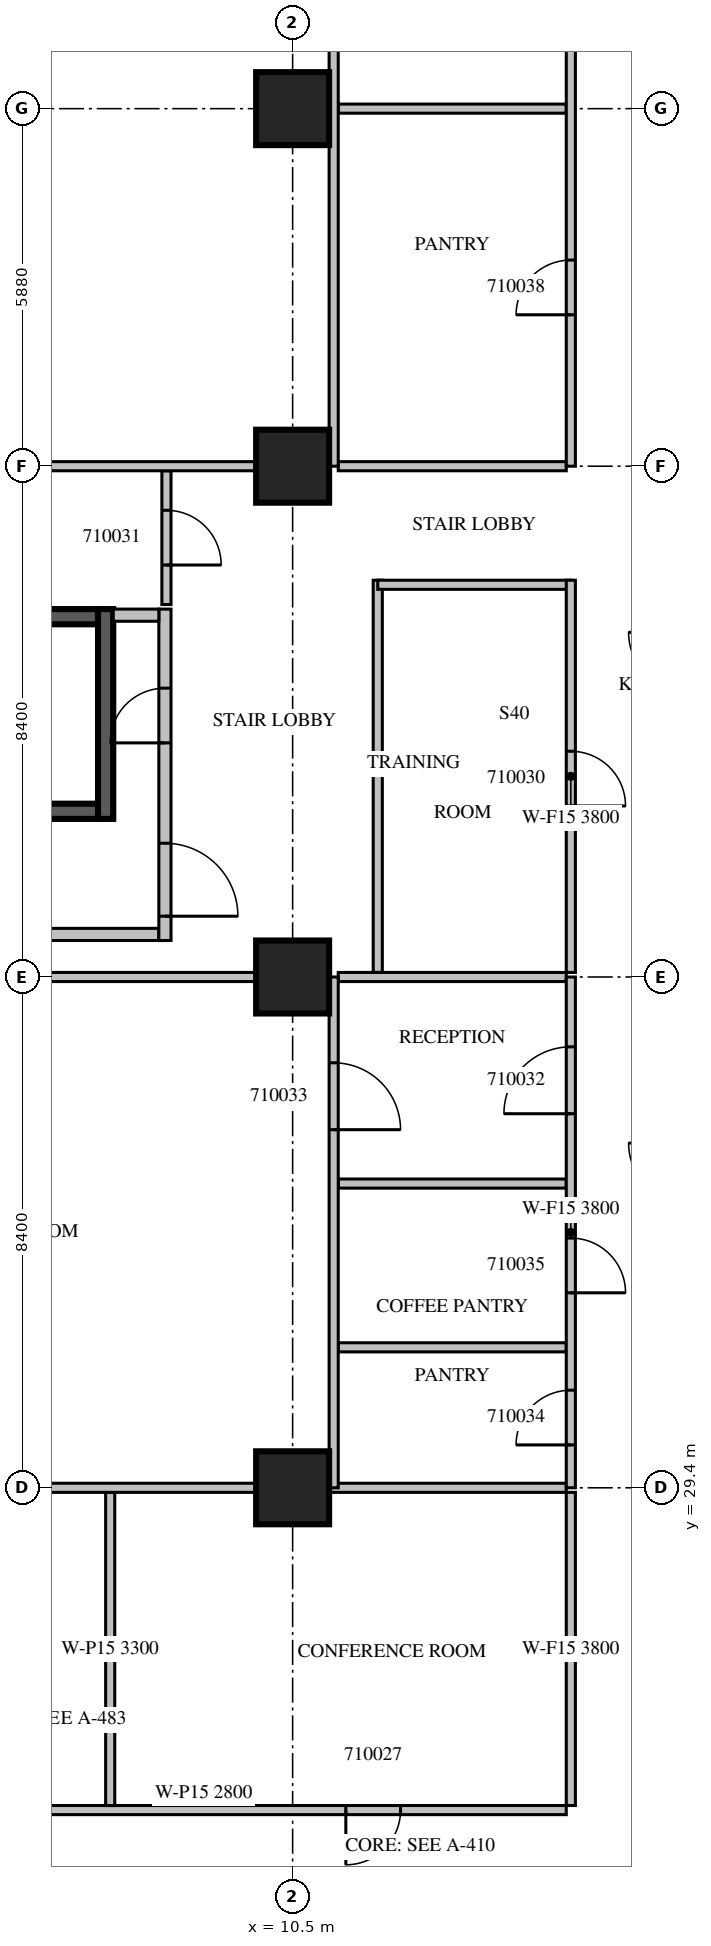
"""IFC4 building model, lengths in metres.
Left out: names, types, materials, properties, quantities, classifications, styles, units other than length and angle.
Written with IfcOpenShell. Run it as: python <this file> out.ifc"""

import sys

from ifc_helpers import new_model, si_unit, direction, frame, frame_2d, origin, origin_2d, place, context, subcontext, project, spatial, rectangle, extrude, source, transform, mapped, element, fill, save


model = new_model("IFC4")
c1 = context("Model", 3, precision=1e-05, world=origin(), true_north=direction((0.0, 1.0)))
c2 = subcontext(c1, "Body", "Model", "MODEL_VIEW")
j1 = project(units=[si_unit("LENGTHUNIT", "METRE"), si_unit("PLANEANGLEUNIT", "RADIAN")], contexts=[c1])
p1 = place(None, origin())
s1 = spatial("IfcSite", under=j1, at=p1, CompositionType="ELEMENT")
p2 = place(p1, origin())
s2 = spatial("IfcBuilding", under=s1, at=p2, CompositionType="ELEMENT")
p3 = place(p2, frame((0.0, 0.0, 53.1)))
s3 = spatial("IfcBuildingStorey", under=s2, at=p3, CompositionType="ELEMENT", Elevation=53.1)
m1 = source(origin(), c2, "Body", "SweptSolid", [
    extrude(rectangle(XDim=1.2, YDim=1.2, at=origin_2d()), origin(), (0.0, 0.0, 1.0), 4.2),
])
for number, where, z_axis, x_axis in (
    (1, (10.5, 29.4, 0.0), (0.0, 0.0, 1.0), (1.0, 0.0, 0.0)),
    (2, (10.5, 37.8, 0.0), (0.0, 0.0, 1.0), (1.0, 0.0, 0.0)),
    (3, (10.5, 46.2, 0.0), (0.0, 0.0, 1.0), (1.0, 0.0, 0.0)),
    (4, (10.5, 52.08, 0.0), (0.0, 0.0, 1.0), (1.0, 0.0, 0.0)),
):
    element("IfcColumn", number, at=place(p3, frame(where, z_axis=z_axis, x_axis=x_axis)), inside=s3, PredefinedType="COLUMN", context=c2, shape_type="MappedRepresentation", body=[
        mapped(m1, transform((0.0, 0.0, 0.0), scale=1.0)),
    ])
m2 = source(origin(), c2, "Body", "SweptSolid", [
    extrude(rectangle(XDim=7.0, YDim=0.25, at=frame_2d((3.5, 0.0))), origin(), (0.0, 0.0, 1.0), 3.8),
])
p4 = place(p3, frame((0.3, 40.525, 0.0), z_axis=(0.0, 0.0, 1.0), x_axis=(1.0, 0.0, 0.0)))
e5 = element("IfcWall", 5, at=p4, inside=s3, PredefinedType="SOLIDWALL", context=c2, shape_type="MappedRepresentation", body=[
    mapped(m2, transform((0.0, 0.0, 0.0), scale=1.0)),
])
m3 = source(origin(), c2, "Body", "SweptSolid", [
    extrude(rectangle(XDim=1.1, YDim=2.1, at=frame_2d((0.55, 1.05))), frame((0.0, 0.135, 0.0), z_axis=(0.0, -1.0, 0.0), x_axis=(1.0, 0.0, 0.0)), (0.0, 0.0, 1.0), 0.27),
])
p5 = place(p4, frame((0.55, 0.0, 0.0)))
e6 = element("IfcOpeningElement", 6, at=p5, cuts=e5, PredefinedType="OPENING", context=c2, shape_type="MappedRepresentation", body=[
    mapped(m3, transform((0.0, 0.0, 0.0), scale=1.0)),
])
p6 = place(p3, frame((0.3, 43.725, 0.0), z_axis=(0.0, 0.0, 1.0), x_axis=(1.0, 0.0, 0.0)))
e7 = element("IfcWall", 7, at=p6, inside=s3, PredefinedType="SOLIDWALL", context=c2, shape_type="MappedRepresentation", body=[
    mapped(m2, transform((0.0, 0.0, 0.0), scale=1.0)),
])
m4 = source(origin(), c2, "Body", "SweptSolid", [
    extrude(rectangle(XDim=3.45, YDim=0.25, at=frame_2d((1.725, 0.0))), origin(), (0.0, 0.0, 1.0), 3.8),
])
p7 = place(p3, frame((7.425, 40.4, 0.0), z_axis=(0.0, 0.0, 1.0), x_axis=(0.0, 1.0, 0.0)))
e8 = element("IfcWall", 8, at=p7, inside=s3, PredefinedType="SOLIDWALL", context=c2, shape_type="MappedRepresentation", body=[
    mapped(m4, transform((0.0, 0.0, 0.0), scale=1.0)),
])
m5 = source(origin(), c2, "Body", "SweptSolid", [
    extrude(rectangle(XDim=8.0, YDim=0.2, at=frame_2d((4.0, 0.0))), origin(), (0.0, 0.0, 1.0), 3.8),
])
p8 = place(p3, frame((0.3, 38.5, 0.0), z_axis=(0.0, 0.0, 1.0), x_axis=(1.0, 0.0, 0.0)))
e9 = element("IfcWall", 9, at=p8, inside=s3, PredefinedType="PARTITIONING", context=c2, shape_type="MappedRepresentation", body=[
    mapped(m5, transform((0.0, 0.0, 0.0), scale=1.0)),
])
m6 = source(origin(), c2, "Body", "SweptSolid", [
    extrude(rectangle(XDim=5.45, YDim=0.2, at=frame_2d((2.725, 0.0))), origin(), (0.0, 0.0, 1.0), 3.8),
])
p9 = place(p3, frame((8.4, 38.4, 0.0), z_axis=(0.0, 0.0, 1.0), x_axis=(0.0, 1.0, 0.0)))
e10 = element("IfcWall", 10, at=p9, inside=s3, PredefinedType="PARTITIONING", context=c2, shape_type="MappedRepresentation", body=[
    mapped(m6, transform((0.0, 0.0, 0.0), scale=1.0)),
])
m7 = source(origin(), c2, "Body", "SweptSolid", [
    extrude(rectangle(XDim=1.2, YDim=2.1, at=frame_2d((0.6, 1.05))), frame((0.0, 0.11, 0.0), z_axis=(0.0, -1.0, 0.0), x_axis=(1.0, 0.0, 0.0)), (0.0, 0.0, 1.0), 0.22),
])
p10 = place(p9, frame((0.4, 0.0, 0.0)))
e11 = element("IfcOpeningElement", 11, at=p10, cuts=e10, PredefinedType="OPENING", context=c2, shape_type="MappedRepresentation", body=[
    mapped(m7, transform((0.0, 0.0, 0.0), scale=1.0)),
])
m8 = source(origin(), c2, "Body", "SweptSolid", [
    extrude(rectangle(XDim=0.9, YDim=2.1, at=frame_2d((0.45, 1.05))), frame((0.0, 0.11, 0.0), z_axis=(0.0, -1.0, 0.0), x_axis=(1.0, 0.0, 0.0)), (0.0, 0.0, 1.0), 0.22),
])
p11 = place(p9, frame((3.25, 0.0, 0.0)))
e12 = element("IfcOpeningElement", 12, at=p11, cuts=e10, PredefinedType="OPENING", context=c2, shape_type="MappedRepresentation", body=[
    mapped(m8, transform((0.0, 0.0, 0.0), scale=1.0)),
])
m9 = source(origin(), c2, "Body", "SweptSolid", [
    extrude(rectangle(XDim=0.75, YDim=0.2, at=frame_2d((0.375, 0.0))), origin(), (0.0, 0.0, 1.0), 3.8),
])
p12 = place(p3, frame((7.55, 43.75, 0.0), z_axis=(0.0, 0.0, 1.0), x_axis=(1.0, 0.0, 0.0)))
e13 = element("IfcWall", 13, at=p12, inside=s3, PredefinedType="PARTITIONING", context=c2, shape_type="MappedRepresentation", body=[
    mapped(m9, transform((0.0, 0.0, 0.0), scale=1.0)),
])
m10 = source(origin(), c2, "Body", "SweptSolid", [
    extrude(rectangle(XDim=11.925, YDim=0.15, at=frame_2d((5.963, 0.0))), origin(), (0.0, 0.0, 1.0), 2.8),
])
p13 = place(p3, frame((3.075, 24.1, 0.0), z_axis=(0.0, 0.0, 1.0), x_axis=(1.0, 0.0, 0.0)))
e14 = element("IfcWall", 14, at=p13, inside=s3, PredefinedType="PARTITIONING", context=c2, shape_type="MappedRepresentation", body=[
    mapped(m10, transform((0.0, 0.0, 0.0), scale=1.0)),
])
m11 = source(origin(), c2, "Body", "SweptSolid", [
    extrude(rectangle(XDim=0.9, YDim=2.1, at=frame_2d((0.45, 1.05))), frame((0.0, 0.085, 0.0), z_axis=(0.0, -1.0, 0.0), x_axis=(1.0, 0.0, 0.0)), (0.0, 0.0, 1.0), 0.17),
])
p14 = place(p13, frame((1.462, 0.0, 0.0)))
e15 = element("IfcOpeningElement", 15, at=p14, cuts=e14, PredefinedType="OPENING", context=c2, shape_type="MappedRepresentation", body=[
    mapped(m11, transform((0.0, 0.0, 0.0), scale=1.0)),
])
p15 = place(p13, frame((8.3, 0.0, 0.0)))
e16 = element("IfcOpeningElement", 16, at=p15, cuts=e14, PredefinedType="OPENING", context=c2, shape_type="MappedRepresentation", body=[
    mapped(m11, transform((0.0, 0.0, 0.0), scale=1.0)),
])
m12 = source(origin(), c2, "Body", "SweptSolid", [
    extrude(rectangle(XDim=5.15, YDim=0.15, at=frame_2d((2.575, 0.0))), origin(), (0.0, 0.0, 1.0), 3.3),
])
p16 = place(p3, frame((7.5, 24.175, 0.0), z_axis=(0.0, 0.0, 1.0), x_axis=(0.0, 1.0, 0.0)))
e17 = element("IfcWall", 17, at=p16, inside=s3, PredefinedType="PARTITIONING", context=c2, shape_type="MappedRepresentation", body=[
    mapped(m12, transform((0.0, 0.0, 0.0), scale=1.0)),
])
m13 = source(origin(), c2, "Body", "SweptSolid", [
    extrude(rectangle(XDim=5.15, YDim=0.15, at=frame_2d((2.575, 0.0))), origin(), (0.0, 0.0, 1.0), 3.8),
])
p17 = place(p3, frame((15.075, 24.175, 0.0), z_axis=(0.0, 0.0, 1.0), x_axis=(0.0, 1.0, 0.0)))
e18 = element("IfcWall", 18, at=p17, inside=s3, PredefinedType="PARTITIONING", context=c2, shape_type="MappedRepresentation", body=[
    mapped(m13, transform((0.0, 0.0, 0.0), scale=1.0)),
])
m14 = source(origin(), c2, "Body", "SweptSolid", [
    extrude(rectangle(XDim=6.826, YDim=0.15, at=frame_2d((3.413, 0.0))), origin(), (0.0, 0.0, 1.0), 3.8),
])
p18 = place(p3, frame((9.901, 29.4, 0.0), z_axis=(0.0, 0.0, 1.0), x_axis=(-1.0, 0.0, 0.0)))
e19 = element("IfcWall", 19, at=p18, inside=s3, PredefinedType="PARTITIONING", context=c2, shape_type="MappedRepresentation", body=[
    mapped(m14, transform((0.0, 0.0, 0.0), scale=1.0)),
])
m15 = source(origin(), c2, "Body", "SweptSolid", [
    extrude(rectangle(XDim=3.901, YDim=0.15, at=frame_2d((1.95, 0.0))), origin(), (0.0, 0.0, 1.0), 3.8),
])
p19 = place(p3, frame((15.0, 29.4, 0.0), z_axis=(0.0, 0.0, 1.0), x_axis=(-1.0, 0.0, 0.0)))
e20 = element("IfcWall", 20, at=p19, inside=s3, PredefinedType="PARTITIONING", context=c2, shape_type="MappedRepresentation", body=[
    mapped(m15, transform((0.0, 0.0, 0.0), scale=1.0)),
])
m16 = source(origin(), c2, "Body", "SweptSolid", [
    extrude(rectangle(XDim=6.45, YDim=0.15, at=frame_2d((3.225, 0.0))), origin(), (0.0, 0.0, 1.0), 3.8),
])
p20 = place(p3, frame((11.9, 44.325, 0.0), z_axis=(0.0, 0.0, 1.0), x_axis=(0.0, -1.0, 0.0)))
e21 = element("IfcWall", 21, at=p20, inside=s3, PredefinedType="PARTITIONING", context=c2, shape_type="MappedRepresentation", body=[
    mapped(m16, transform((0.0, 0.0, 0.0), scale=1.0)),
])
m17 = source(origin(), c2, "Body", "SweptSolid", [
    extrude(rectangle(XDim=3.175, YDim=0.15, at=frame_2d((1.587, 0.0))), origin(), (0.0, 0.0, 1.0), 3.8),
])
p21 = place(p3, frame((15.075, 44.25, 0.0), z_axis=(0.0, 0.0, 1.0), x_axis=(-1.0, 0.0, 0.0)))
e22 = element("IfcWall", 22, at=p21, inside=s3, PredefinedType="PARTITIONING", context=c2, shape_type="MappedRepresentation", body=[
    mapped(m17, transform((0.0, 0.0, 0.0), scale=1.0)),
])
p22 = place(p3, frame((15.075, 37.875, 0.0), z_axis=(0.0, 0.0, 1.0), x_axis=(0.0, 1.0, 0.0)))
e23 = element("IfcWall", 23, at=p22, inside=s3, PredefinedType="PARTITIONING", context=c2, shape_type="MappedRepresentation", body=[
    mapped(m16, transform((0.0, 0.0, 0.0), scale=1.0)),
])
p23 = place(p22, frame((2.737, 0.0, 0.0)))
e24 = element("IfcOpeningElement", 24, at=p23, cuts=e23, PredefinedType="OPENING", context=c2, shape_type="MappedRepresentation", body=[
    mapped(m11, transform((0.0, 0.0, 0.0), scale=1.0)),
])
m18 = source(origin(), c2, "Body", "SweptSolid", [
    extrude(rectangle(XDim=2.2, YDim=0.15, at=frame_2d((1.1, 0.0))), origin(), (0.0, 0.0, 1.0), 3.8),
])
p24 = place(p3, frame((8.425, 43.925, 0.0), z_axis=(0.0, 0.0, 1.0), x_axis=(0.0, 1.0, 0.0)))
e25 = element("IfcWall", 25, at=p24, inside=s3, PredefinedType="PARTITIONING", context=c2, shape_type="MappedRepresentation", body=[
    mapped(m18, transform((0.0, 0.0, 0.0), scale=1.0)),
])
p25 = place(p24, frame((0.65, 0.0, 0.0)))
e26 = element("IfcOpeningElement", 26, at=p25, cuts=e25, PredefinedType="OPENING", context=c2, shape_type="MappedRepresentation", body=[
    mapped(m11, transform((0.0, 0.0, 0.0), scale=1.0)),
])
m19 = source(origin(), c2, "Body", "SweptSolid", [
    extrude(rectangle(XDim=3.75, YDim=0.15, at=frame_2d((1.875, 0.0))), origin(), (0.0, 0.0, 1.0), 3.8),
])
for number, where, z_axis, x_axis in (
    (27, (15.0, 31.71, 0.0), (0.0, 0.0, 1.0), (-1.0, 0.0, 0.0)),
    (28, (15.0, 34.403, 0.0), (0.0, 0.0, 1.0), (-1.0, 0.0, 0.0)),
):
    element("IfcWall", number, at=place(p3, frame(where, z_axis=z_axis, x_axis=x_axis)), inside=s3, PredefinedType="PARTITIONING", context=c2, shape_type="MappedRepresentation", body=[
        mapped(m19, transform((0.0, 0.0, 0.0), scale=1.0)),
    ])
m20 = source(origin(), c2, "Body", "SweptSolid", [
    extrude(rectangle(XDim=8.702, YDim=0.15, at=frame_2d((4.351, 0.0))), origin(), (0.0, 0.0, 1.0), 3.8),
])
p26 = place(p3, frame((9.901, 37.8, 0.0), z_axis=(0.0, 0.0, 1.0), x_axis=(-1.0, 0.0, 0.0)))
e29 = element("IfcWall", 29, at=p26, inside=s3, PredefinedType="PARTITIONING", context=c2, shape_type="MappedRepresentation", body=[
    mapped(m20, transform((0.0, 0.0, 0.0), scale=1.0)),
])
p27 = place(p3, frame((15.0, 37.8, 0.0), z_axis=(0.0, 0.0, 1.0), x_axis=(-1.0, 0.0, 0.0)))
e30 = element("IfcWall", 30, at=p27, inside=s3, PredefinedType="PARTITIONING", context=c2, shape_type="MappedRepresentation", body=[
    mapped(m19, transform((0.0, 0.0, 0.0), scale=1.0)),
])
m21 = source(origin(), c2, "Body", "SweptSolid", [
    extrude(rectangle(XDim=8.4, YDim=0.15, at=frame_2d((4.2, 0.0))), origin(), (0.0, 0.0, 1.0), 3.8),
])
p28 = place(p3, frame((11.175, 29.4, 0.0), z_axis=(0.0, 0.0, 1.0), x_axis=(0.0, 1.0, 0.0)))
e31 = element("IfcWall", 31, at=p28, inside=s3, PredefinedType="PARTITIONING", context=c2, shape_type="MappedRepresentation", body=[
    mapped(m21, transform((0.0, 0.0, 0.0), scale=1.0)),
])
m22 = source(origin(), c2, "Body", "SweptSolid", [
    extrude(rectangle(XDim=1.1, YDim=2.1, at=frame_2d((0.55, 1.05))), frame((0.0, 0.085, 0.0), z_axis=(0.0, -1.0, 0.0), x_axis=(1.0, 0.0, 0.0)), (0.0, 0.0, 1.0), 0.17),
])
p29 = place(p28, frame((5.889, 0.0, 0.0)))
e32 = element("IfcOpeningElement", 32, at=p29, cuts=e31, PredefinedType="OPENING", context=c2, shape_type="MappedRepresentation", body=[
    mapped(m22, transform((0.0, 0.0, 0.0), scale=1.0)),
])
p30 = place(p3, frame((15.0, 52.08, 0.0), z_axis=(0.0, 0.0, 1.0), x_axis=(-1.0, 0.0, 0.0)))
e33 = element("IfcWall", 33, at=p30, inside=s3, PredefinedType="PARTITIONING", context=c2, shape_type="MappedRepresentation", body=[
    mapped(m19, transform((0.0, 0.0, 0.0), scale=1.0)),
])
p31 = place(p3, frame((9.901, 46.2, 0.0), z_axis=(0.0, 0.0, 1.0), x_axis=(-1.0, 0.0, 0.0)))
e34 = element("IfcWall", 34, at=p31, inside=s3, PredefinedType="PARTITIONING", context=c2, shape_type="MappedRepresentation", body=[
    mapped(m20, transform((0.0, 0.0, 0.0), scale=1.0)),
])
p32 = place(p3, frame((15.0, 46.2, 0.0), z_axis=(0.0, 0.0, 1.0), x_axis=(-1.0, 0.0, 0.0)))
e35 = element("IfcWall", 35, at=p32, inside=s3, PredefinedType="PARTITIONING", context=c2, shape_type="MappedRepresentation", body=[
    mapped(m19, transform((0.0, 0.0, 0.0), scale=1.0)),
])
m23 = source(origin(), c2, "Body", "SweptSolid", [
    extrude(rectangle(XDim=19.02, YDim=0.15, at=frame_2d((9.51, 0.0))), origin(), (0.0, 0.0, 1.0), 3.3),
])
p33 = place(p3, frame((11.175, 46.2, 0.0), z_axis=(0.0, 0.0, 1.0), x_axis=(0.0, 1.0, 0.0)))
e36 = element("IfcWall", 36, at=p33, inside=s3, PredefinedType="PARTITIONING", context=c2, shape_type="MappedRepresentation", body=[
    mapped(m23, transform((0.0, 0.0, 0.0), scale=1.0)),
])
p34 = place(p33, frame((13.412, 0.0, 0.0)))
e37 = element("IfcOpeningElement", 37, at=p34, cuts=e36, PredefinedType="OPENING", context=c2, shape_type="MappedRepresentation", body=[
    mapped(m22, transform((0.0, 0.0, 0.0), scale=1.0)),
])
p35 = place(p33, frame((15.777, 0.0, 0.0)))
e38 = element("IfcOpeningElement", 38, at=p35, cuts=e36, PredefinedType="OPENING", context=c2, shape_type="MappedRepresentation", body=[
    mapped(m22, transform((0.0, 0.0, 0.0), scale=1.0)),
])
p36 = place(p3, frame((15.075, 29.4, 0.0), z_axis=(0.0, 0.0, 1.0), x_axis=(0.0, 1.0, 0.0)))
e39 = element("IfcWall", 39, at=p36, inside=s3, PredefinedType="PARTITIONING", context=c2, shape_type="MappedRepresentation", body=[
    mapped(m21, transform((0.0, 0.0, 0.0), scale=1.0)),
])
p37 = place(p36, frame((6.152, 0.0, 0.0)))
e40 = element("IfcOpeningElement", 40, at=p37, cuts=e39, PredefinedType="OPENING", context=c2, shape_type="MappedRepresentation", body=[
    mapped(m22, transform((0.0, 0.0, 0.0), scale=1.0)),
])
p38 = place(p36, frame((0.705, 0.0, 0.0)))
e41 = element("IfcOpeningElement", 41, at=p38, cuts=e39, PredefinedType="OPENING", context=c2, shape_type="MappedRepresentation", body=[
    mapped(m11, transform((0.0, 0.0, 0.0), scale=1.0)),
])
p39 = place(p36, frame((3.207, 0.0, 0.0)))
e42 = element("IfcOpeningElement", 42, at=p39, cuts=e39, PredefinedType="OPENING", context=c2, shape_type="MappedRepresentation", body=[
    mapped(m11, transform((0.0, 0.0, 0.0), scale=1.0)),
])
p40 = place(p3, frame((15.075, 46.2, 0.0), z_axis=(0.0, 0.0, 1.0), x_axis=(0.0, 1.0, 0.0)))
e43 = element("IfcWall", 43, at=p40, inside=s3, PredefinedType="PARTITIONING", context=c2, shape_type="MappedRepresentation", body=[
    mapped(m23, transform((0.0, 0.0, 0.0), scale=1.0)),
])
p41 = place(p40, frame((13.1, 0.0, 0.0)))
e44 = element("IfcOpeningElement", 44, at=p41, cuts=e43, PredefinedType="OPENING", context=c2, shape_type="MappedRepresentation", body=[
    mapped(m22, transform((0.0, 0.0, 0.0), scale=1.0)),
])
p42 = place(p40, frame((2.49, 0.0, 0.0)))
e45 = element("IfcOpeningElement", 45, at=p42, cuts=e43, PredefinedType="OPENING", context=c2, shape_type="MappedRepresentation", body=[
    mapped(m11, transform((0.0, 0.0, 0.0), scale=1.0)),
])
p43 = place(p40, frame((8.37, 0.0, 0.0)))
e46 = element("IfcOpeningElement", 46, at=p43, cuts=e43, PredefinedType="OPENING", context=c2, shape_type="MappedRepresentation", body=[
    mapped(m11, transform((0.0, 0.0, 0.0), scale=1.0)),
])
p44 = place(p40, frame((16.767, 0.0, 0.0)))
e47 = element("IfcOpeningElement", 47, at=p44, cuts=e43, PredefinedType="OPENING", context=c2, shape_type="MappedRepresentation", body=[
    mapped(m22, transform((0.0, 0.0, 0.0), scale=1.0)),
])
m24 = source(origin(), c2, "Body", "SweptSolid", [
    extrude(rectangle(XDim=1.2, YDim=2.1, at=frame_2d((0.6, 1.05))), frame((0.0, 0.025, 0.0), z_axis=(0.0, -1.0, 0.0), x_axis=(1.0, 0.0, 0.0)), (0.0, 0.0, 1.0), 0.05),
])
p45 = place(p10, origin())
e48 = element("IfcDoor", 48, at=p45, inside=s3, OperationType="SINGLE_SWING_RIGHT", PredefinedType="DOOR", context=c2, shape_type="MappedRepresentation", body=[
    mapped(m24, transform((0.0, 0.0, 0.0), scale=1.0)),
])
fill(e11, e48)
m25 = source(origin(), c2, "Body", "SweptSolid", [
    extrude(rectangle(XDim=0.9, YDim=2.1, at=frame_2d((0.45, 1.05))), frame((0.0, 0.025, 0.0), z_axis=(0.0, -1.0, 0.0), x_axis=(1.0, 0.0, 0.0)), (0.0, 0.0, 1.0), 0.05),
])
p46 = place(p11, origin())
e49 = element("IfcDoor", 49, at=p46, inside=s3, OperationType="SINGLE_SWING_LEFT", PredefinedType="DOOR", context=c2, shape_type="MappedRepresentation", body=[
    mapped(m25, transform((0.0, 0.0, 0.0), scale=1.0)),
])
fill(e12, e49)
p47 = place(p15, origin())
e50 = element("IfcDoor", 50, at=p47, inside=s3, OperationType="SINGLE_SWING_RIGHT", PredefinedType="DOOR", context=c2, shape_type="MappedRepresentation", body=[
    mapped(m25, transform((0.0, 0.0, 0.0), scale=1.0)),
])
fill(e16, e50)
p48 = place(p23, origin())
e51 = element("IfcDoor", 51, at=p48, inside=s3, OperationType="SINGLE_SWING_RIGHT", PredefinedType="DOOR", context=c2, shape_type="MappedRepresentation", body=[
    mapped(m25, transform((0.0, 0.0, 0.0), scale=1.0)),
])
fill(e24, e51)
p49 = place(p25, origin())
e52 = element("IfcDoor", 52, at=p49, inside=s3, OperationType="SINGLE_SWING_RIGHT", PredefinedType="DOOR", context=c2, shape_type="MappedRepresentation", body=[
    mapped(m25, transform((0.0, 0.0, 0.0), scale=1.0)),
])
fill(e26, e52)
m26 = source(origin(), c2, "Body", "SweptSolid", [
    extrude(rectangle(XDim=1.1, YDim=2.1, at=frame_2d((0.55, 1.05))), frame((0.0, 0.025, 0.0), z_axis=(0.0, -1.0, 0.0), x_axis=(1.0, 0.0, 0.0)), (0.0, 0.0, 1.0), 0.05),
])
p50 = place(p37, origin())
e53 = element("IfcDoor", 53, at=p50, inside=s3, OperationType="SINGLE_SWING_LEFT", PredefinedType="DOOR", context=c2, shape_type="MappedRepresentation", body=[
    mapped(m26, transform((0.0, 0.0, 0.0), scale=1.0)),
])
fill(e40, e53)
p51 = place(p29, origin())
e54 = element("IfcDoor", 54, at=p51, inside=s3, OperationType="SINGLE_SWING_RIGHT", PredefinedType="DOOR", context=c2, shape_type="MappedRepresentation", body=[
    mapped(m26, transform((0.0, 0.0, 0.0), scale=1.0)),
])
fill(e32, e54)
p52 = place(p38, origin())
e55 = element("IfcDoor", 55, at=p52, inside=s3, OperationType="SINGLE_SWING_LEFT", PredefinedType="DOOR", context=c2, shape_type="MappedRepresentation", body=[
    mapped(m25, transform((0.0, 0.0, 0.0), scale=1.0)),
])
fill(e41, e55)
p53 = place(p39, origin())
e56 = element("IfcDoor", 56, at=p53, inside=s3, OperationType="SINGLE_SWING_RIGHT", PredefinedType="DOOR", context=c2, shape_type="MappedRepresentation", body=[
    mapped(m25, transform((0.0, 0.0, 0.0), scale=1.0)),
])
fill(e42, e56)
p54 = place(p42, origin())
e57 = element("IfcDoor", 57, at=p54, inside=s3, OperationType="SINGLE_SWING_LEFT", PredefinedType="DOOR", context=c2, shape_type="MappedRepresentation", body=[
    mapped(m25, transform((0.0, 0.0, 0.0), scale=1.0)),
])
fill(e45, e57)
save(model, sys.argv[1])
